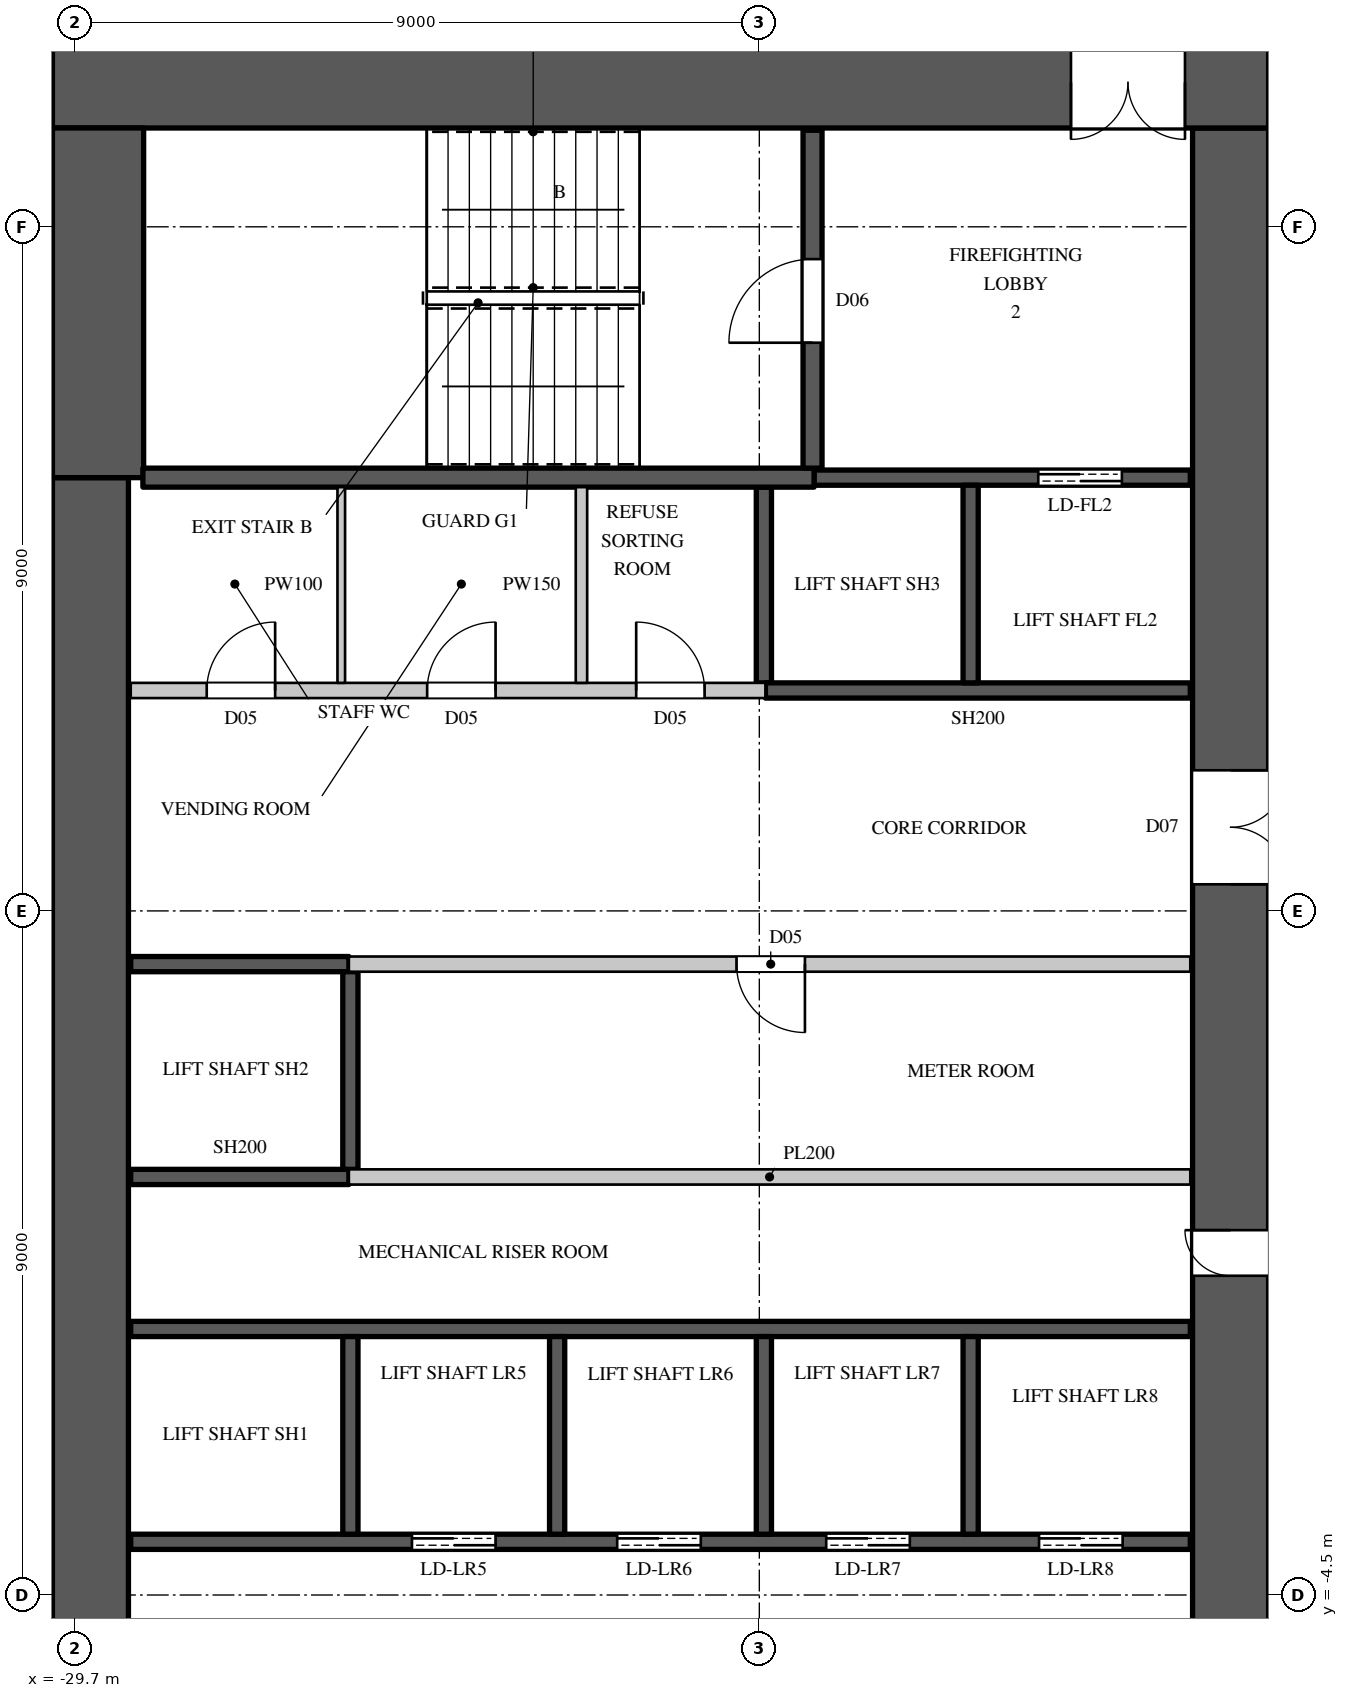
"""IFC4 building model, lengths in metres.
Left out: names, types, materials, properties, quantities, classifications, styles, units other than length and angle.
Written with IfcOpenShell. Run it as: python <this file> out.ifc"""

import sys

from ifc_helpers import new_model, si_unit, direction, frame, frame_2d, origin, place, context, subcontext, project, spatial, rectangle, extrude, element, fill, save


model = new_model("IFC4")
c1 = context("Model", 3, precision=1e-05, world=origin(), true_north=direction((0.0, 1.0)))
c2 = subcontext(c1, "Body", "Model", "MODEL_VIEW")
j1 = project(units=[si_unit("LENGTHUNIT", "METRE"), si_unit("PLANEANGLEUNIT", "RADIAN")], contexts=[c1])
p1 = place(None, origin())
s1 = spatial("IfcSite", under=j1, at=p1, CompositionType="ELEMENT")
p2 = place(p1, origin())
s2 = spatial("IfcBuilding", under=s1, at=p2, CompositionType="ELEMENT")
p3 = place(p2, frame((0.0, 0.0, 73.5)))
s3 = spatial("IfcBuildingStorey", under=s2, at=p3, CompositionType="ELEMENT", Elevation=73.5)
p4 = place(p3, frame((-30.0, 15.4, 0.0), z_axis=(0.0, 0.0, 1.0), x_axis=(1.0, 0.0, 0.0)))
e1 = element("IfcWall", 1, at=p4, inside=s3, PredefinedType="SHEAR", context=c2, shape_type="SweptSolid", body=[
    extrude(rectangle(XDim=16.0, YDim=1.2, at=frame_2d((8.0, 0.0))), origin(), (0.0, 0.0, 1.0), 3.6),
])
p5 = place(p4, frame((13.4, 0.0, 0.0)))
e2 = element("IfcOpeningElement", 2, at=p5, cuts=e1, PredefinedType="OPENING", context=c2, shape_type="SweptSolid", body=[
    extrude(rectangle(XDim=1.5, YDim=2.4, at=frame_2d((0.75, 1.2))), frame((0.0, 0.61, 0.0), z_axis=(0.0, -1.0, 0.0), x_axis=(1.0, 0.0, 0.0)), (0.0, 0.0, 1.0), 1.22),
])
p6 = place(p3, frame((-14.5, -14.8, 0.0), z_axis=(0.0, 0.0, 1.0), x_axis=(0.0, 1.0, 0.0)))
e3 = element("IfcWall", 3, at=p6, inside=s3, PredefinedType="SHEAR", context=c2, shape_type="SweptSolid", body=[
    extrude(rectangle(XDim=29.6, YDim=1.0, at=frame_2d((14.8, 0.0))), origin(), (0.0, 0.0, 1.0), 3.6),
])
p7 = place(p6, frame((8.45, 0.0, 0.0)))
e4 = element("IfcOpeningElement", 4, at=p7, cuts=e3, PredefinedType="OPENING", context=c2, shape_type="SweptSolid", body=[
    extrude(rectangle(XDim=1.5, YDim=2.4, at=frame_2d((0.75, 1.2))), frame((0.0, 0.51, 0.0), z_axis=(0.0, -1.0, 0.0), x_axis=(1.0, 0.0, 0.0)), (0.0, 0.0, 1.0), 1.02),
])
p8 = place(p6, frame((19.65, 0.0, 0.0)))
e5 = element("IfcOpeningElement", 5, at=p8, cuts=e3, PredefinedType="OPENING", context=c2, shape_type="SweptSolid", body=[
    extrude(rectangle(XDim=1.5, YDim=2.4, at=frame_2d((0.75, 1.2))), frame((0.0, 0.51, 0.0), z_axis=(0.0, -1.0, 0.0), x_axis=(1.0, 0.0, 0.0)), (0.0, 0.0, 1.0), 1.02),
])
p9 = place(p6, frame((14.5, 0.0, 0.0)))
e6 = element("IfcOpeningElement", 6, at=p9, cuts=e3, PredefinedType="OPENING", context=c2, shape_type="SweptSolid", body=[
    extrude(rectangle(XDim=0.6, YDim=2.0, at=frame_2d((0.3, 1.0))), frame((0.0, 0.51, 0.0), z_axis=(0.0, -1.0, 0.0), x_axis=(1.0, 0.0, 0.0)), (0.0, 0.0, 1.0), 1.02),
])
p10 = place(p3, frame((-29.5, -10.2, 0.0), z_axis=(0.0, 0.0, 1.0), x_axis=(0.0, 1.0, 0.0)))
e7 = element("IfcWall", 7, at=p10, inside=s3, PredefinedType="SHEAR", context=c2, shape_type="SweptSolid", body=[
    extrude(rectangle(XDim=20.4, YDim=1.0, at=frame_2d((10.2, 0.0))), origin(), (0.0, 0.0, 1.0), 3.6),
])
p11 = place(p3, frame((-29.4, 10.2, 0.0), z_axis=(0.0, 0.0, 1.0), x_axis=(0.0, 1.0, 0.0)))
e8 = element("IfcWall", 8, at=p11, inside=s3, PredefinedType="SHEAR", context=c2, shape_type="SweptSolid", body=[
    extrude(rectangle(XDim=4.6, YDim=1.2, at=frame_2d((2.3, 0.0))), origin(), (0.0, 0.0, 1.0), 3.6),
])
p12 = place(p3, frame((-28.97, 7.4, 0.0), z_axis=(0.0, 0.0, 1.0), x_axis=(1.0, 0.0, 0.0)))
e9 = element("IfcWall", 9, at=p12, inside=s3, PredefinedType="PARTITIONING", context=c2, shape_type="SweptSolid", body=[
    extrude(rectangle(XDim=8.35, YDim=0.2, at=frame_2d((4.175, 0.0))), origin(), (0.0, 0.0, 1.0), 3.3),
])
p13 = place(p12, frame((1.0, 0.0, 0.0)))
e10 = element("IfcOpeningElement", 10, at=p13, cuts=e9, PredefinedType="OPENING", context=c2, shape_type="SweptSolid", body=[
    extrude(rectangle(XDim=0.9, YDim=2.2, at=frame_2d((0.45, 1.1))), frame((0.0, 0.11, 0.0), z_axis=(0.0, -1.0, 0.0), x_axis=(1.0, 0.0, 0.0)), (0.0, 0.0, 1.0), 0.22),
])
p14 = place(p12, frame((3.9, 0.0, 0.0)))
e11 = element("IfcOpeningElement", 11, at=p14, cuts=e9, PredefinedType="OPENING", context=c2, shape_type="SweptSolid", body=[
    extrude(rectangle(XDim=0.9, YDim=2.2, at=frame_2d((0.45, 1.1))), frame((0.0, 0.11, 0.0), z_axis=(0.0, -1.0, 0.0), x_axis=(1.0, 0.0, 0.0)), (0.0, 0.0, 1.0), 0.22),
])
p15 = place(p12, frame((6.65, 0.0, 0.0)))
e12 = element("IfcOpeningElement", 12, at=p15, cuts=e9, PredefinedType="OPENING", context=c2, shape_type="SweptSolid", body=[
    extrude(rectangle(XDim=0.9, YDim=2.2, at=frame_2d((0.45, 1.1))), frame((0.0, 0.11, 0.0), z_axis=(0.0, -1.0, 0.0), x_axis=(1.0, 0.0, 0.0)), (0.0, 0.0, 1.0), 0.22),
])
p16 = place(p3, frame((-23.04, 7.5, 0.0), z_axis=(0.0, 0.0, 1.0), x_axis=(0.0, 1.0, 0.0)))
e13 = element("IfcWall", 13, at=p16, inside=s3, PredefinedType="PARTITIONING", context=c2, shape_type="SweptSolid", body=[
    extrude(rectangle(XDim=2.575, YDim=0.15, at=frame_2d((1.288, 0.0))), origin(), (0.0, 0.0, 1.0), 3.3),
])
p17 = place(p3, frame((-26.1, 1.0, 0.0), z_axis=(0.0, 0.0, 1.0), x_axis=(1.0, 0.0, 0.0)))
e14 = element("IfcWall", 14, at=p17, inside=s3, PredefinedType="PARTITIONING", context=c2, shape_type="SweptSolid", body=[
    extrude(rectangle(XDim=11.07, YDim=0.2, at=frame_2d((5.535, 0.0))), origin(), (0.0, 0.0, 1.0), 3.3),
])
p18 = place(p3, frame((-26.1, 3.8, 0.0), z_axis=(0.0, 0.0, 1.0), x_axis=(1.0, 0.0, 0.0)))
e15 = element("IfcWall", 15, at=p18, inside=s3, PredefinedType="PARTITIONING", context=c2, shape_type="SweptSolid", body=[
    extrude(rectangle(XDim=11.07, YDim=0.2, at=frame_2d((5.535, 0.0))), origin(), (0.0, 0.0, 1.0), 3.3),
])
p19 = place(p18, frame((5.1, 0.0, 0.0)))
e16 = element("IfcOpeningElement", 16, at=p19, cuts=e15, PredefinedType="OPENING", context=c2, shape_type="SweptSolid", body=[
    extrude(rectangle(XDim=0.9, YDim=2.2, at=frame_2d((0.45, 1.1))), frame((0.0, 0.11, 0.0), z_axis=(0.0, -1.0, 0.0), x_axis=(1.0, 0.0, 0.0)), (0.0, 0.0, 1.0), 0.22),
])
p20 = place(p3, frame((-28.97, -3.8, 0.0), z_axis=(0.0, 0.0, 1.0), x_axis=(1.0, 0.0, 0.0)))
e17 = element("IfcWall", 17, at=p20, inside=s3, PredefinedType="SHEAR", context=c2, shape_type="SweptSolid", body=[
    extrude(rectangle(XDim=13.94, YDim=0.2, at=frame_2d((6.97, 0.0))), origin(), (0.0, 0.0, 1.0), 3.3),
])
p21 = place(p20, frame((3.7, 0.0, 0.0)))
e18 = element("IfcOpeningElement", 18, at=p21, cuts=e17, PredefinedType="OPENING", context=c2, shape_type="SweptSolid", body=[
    extrude(rectangle(XDim=1.1, YDim=2.2, at=frame_2d((0.55, 1.1))), frame((0.0, 0.11, 0.0), z_axis=(0.0, -1.0, 0.0), x_axis=(1.0, 0.0, 0.0)), (0.0, 0.0, 1.0), 0.22),
])
p22 = place(p20, frame((6.4, 0.0, 0.0)))
e19 = element("IfcOpeningElement", 19, at=p22, cuts=e17, PredefinedType="OPENING", context=c2, shape_type="SweptSolid", body=[
    extrude(rectangle(XDim=1.1, YDim=2.2, at=frame_2d((0.55, 1.1))), frame((0.0, 0.11, 0.0), z_axis=(0.0, -1.0, 0.0), x_axis=(1.0, 0.0, 0.0)), (0.0, 0.0, 1.0), 0.22),
])
p23 = place(p20, frame((9.15, 0.0, 0.0)))
e20 = element("IfcOpeningElement", 20, at=p23, cuts=e17, PredefinedType="OPENING", context=c2, shape_type="SweptSolid", body=[
    extrude(rectangle(XDim=1.1, YDim=2.2, at=frame_2d((0.55, 1.1))), frame((0.0, 0.11, 0.0), z_axis=(0.0, -1.0, 0.0), x_axis=(1.0, 0.0, 0.0)), (0.0, 0.0, 1.0), 0.22),
])
p24 = place(p20, frame((11.95, 0.0, 0.0)))
e21 = element("IfcOpeningElement", 21, at=p24, cuts=e17, PredefinedType="OPENING", context=c2, shape_type="SweptSolid", body=[
    extrude(rectangle(XDim=1.1, YDim=2.2, at=frame_2d((0.55, 1.1))), frame((0.0, 0.11, 0.0), z_axis=(0.0, -1.0, 0.0), x_axis=(1.0, 0.0, 0.0)), (0.0, 0.0, 1.0), 0.22),
])
p25 = place(p3, frame((-28.97, -1.0, 0.0), z_axis=(0.0, 0.0, 1.0), x_axis=(1.0, 0.0, 0.0)))
e22 = element("IfcWall", 22, at=p25, inside=s3, PredefinedType="SHEAR", context=c2, shape_type="SweptSolid", body=[
    extrude(rectangle(XDim=13.94, YDim=0.2, at=frame_2d((6.97, 0.0))), origin(), (0.0, 0.0, 1.0), 3.3),
])
for number, where, z_axis, x_axis in (
    (23, (-28.97, 1.0, 0.0), (0.0, 0.0, 1.0), (1.0, 0.0, 0.0)),
    (24, (-28.97, 3.8, 0.0), (0.0, 0.0, 1.0), (1.0, 0.0, 0.0)),
):
    element("IfcWall", number, at=place(p3, frame(where, z_axis=z_axis, x_axis=x_axis)), inside=s3, PredefinedType="SHEAR", context=c2, shape_type="SweptSolid", body=[
        extrude(rectangle(XDim=2.87, YDim=0.2, at=frame_2d((1.435, 0.0))), origin(), (0.0, 0.0, 1.0), 3.3),
    ])
p26 = place(p3, frame((-26.08, -3.7, 0.0), z_axis=(0.0, 0.0, 1.0), x_axis=(0.0, 1.0, 0.0)))
e25 = element("IfcWall", 25, at=p26, inside=s3, PredefinedType="SHEAR", context=c2, shape_type="SweptSolid", body=[
    extrude(rectangle(XDim=2.6, YDim=0.2, at=frame_2d((1.3, 0.0))), origin(), (0.0, 0.0, 1.0), 3.6),
])
p27 = place(p3, frame((-26.08, 1.1, 0.0), z_axis=(0.0, 0.0, 1.0), x_axis=(0.0, 1.0, 0.0)))
e26 = element("IfcWall", 26, at=p27, inside=s3, PredefinedType="SHEAR", context=c2, shape_type="SweptSolid", body=[
    extrude(rectangle(XDim=2.6, YDim=0.2, at=frame_2d((1.3, 0.0))), origin(), (0.0, 0.0, 1.0), 3.3),
])
for number, where, z_axis, x_axis in (
    (27, (-23.36, -3.7, 0.0), (0.0, 0.0, 1.0), (0.0, 1.0, 0.0)),
    (28, (-20.64, -3.7, 0.0), (0.0, 0.0, 1.0), (0.0, 1.0, 0.0)),
):
    element("IfcWall", number, at=place(p3, frame(where, z_axis=z_axis, x_axis=x_axis)), inside=s3, PredefinedType="SHEAR", context=c2, shape_type="SweptSolid", body=[
        extrude(rectangle(XDim=2.6, YDim=0.2, at=frame_2d((1.3, 0.0))), origin(), (0.0, 0.0, 1.0), 3.6),
    ])
p28 = place(p3, frame((-20.64, 7.5, 0.0), z_axis=(0.0, 0.0, 1.0), x_axis=(0.0, 1.0, 0.0)))
e29 = element("IfcWall", 29, at=p28, inside=s3, PredefinedType="SHEAR", context=c2, shape_type="SweptSolid", body=[
    extrude(rectangle(XDim=2.575, YDim=0.2, at=frame_2d((1.288, 0.0))), origin(), (0.0, 0.0, 1.0), 3.3),
])
p29 = place(p3, frame((-20.62, 7.4, 0.0), z_axis=(0.0, 0.0, 1.0), x_axis=(1.0, 0.0, 0.0)))
e30 = element("IfcWall", 30, at=p29, inside=s3, PredefinedType="SHEAR", context=c2, shape_type="SweptSolid", body=[
    extrude(rectangle(XDim=5.59, YDim=0.2, at=frame_2d((2.795, 0.0))), origin(), (0.0, 0.0, 1.0), 3.3),
])
p30 = place(p3, frame((-19.98, 10.2, 0.0), z_axis=(0.0, 0.0, 1.0), x_axis=(1.0, 0.0, 0.0)))
e31 = element("IfcWall", 31, at=p30, inside=s3, PredefinedType="SHEAR", context=c2, shape_type="SweptSolid", body=[
    extrude(rectangle(XDim=4.95, YDim=0.2, at=frame_2d((2.475, 0.0))), origin(), (0.0, 0.0, 1.0), 3.3),
])
p31 = place(p30, frame((2.95, 0.0, 0.0)))
e32 = element("IfcOpeningElement", 32, at=p31, cuts=e31, PredefinedType="OPENING", context=c2, shape_type="SweptSolid", body=[
    extrude(rectangle(XDim=1.1, YDim=2.2, at=frame_2d((0.55, 1.1))), frame((0.0, 0.11, 0.0), z_axis=(0.0, -1.0, 0.0), x_axis=(1.0, 0.0, 0.0)), (0.0, 0.0, 1.0), 0.22),
])
p32 = place(p3, frame((-17.92, -3.7, 0.0), z_axis=(0.0, 0.0, 1.0), x_axis=(0.0, 1.0, 0.0)))
e33 = element("IfcWall", 33, at=p32, inside=s3, PredefinedType="SHEAR", context=c2, shape_type="SweptSolid", body=[
    extrude(rectangle(XDim=2.6, YDim=0.2, at=frame_2d((1.3, 0.0))), origin(), (0.0, 0.0, 1.0), 3.6),
])
p33 = place(p3, frame((-17.92, 7.5, 0.0), z_axis=(0.0, 0.0, 1.0), x_axis=(0.0, 1.0, 0.0)))
e34 = element("IfcWall", 34, at=p33, inside=s3, PredefinedType="SHEAR", context=c2, shape_type="SweptSolid", body=[
    extrude(rectangle(XDim=2.6, YDim=0.2, at=frame_2d((1.3, 0.0))), origin(), (0.0, 0.0, 1.0), 3.6),
])
p34 = place(p3, frame((-28.81, 10.2, 0.0), z_axis=(0.0, 0.0, 1.0), x_axis=(1.0, 0.0, 0.0)))
e35 = element("IfcWall", 35, at=p34, inside=s3, PredefinedType="SHEAR", context=c2, shape_type="SweptSolid", body=[
    extrude(rectangle(XDim=8.83, YDim=0.25, at=frame_2d((4.415, 0.0))), origin(), (0.0, 0.0, 1.0), 3.3),
])
p35 = place(p3, frame((-20.0, 10.325, 0.0), z_axis=(0.0, 0.0, 1.0), x_axis=(0.0, 1.0, 0.0)))
e36 = element("IfcWall", 36, at=p35, inside=s3, PredefinedType="SHEAR", context=c2, shape_type="SweptSolid", body=[
    extrude(rectangle(XDim=4.445, YDim=0.25, at=frame_2d((2.223, 0.0))), origin(), (0.0, 0.0, 1.0), 3.3),
])
p36 = place(p35, frame((1.65, 0.0, 0.0)))
e37 = element("IfcOpeningElement", 37, at=p36, cuts=e36, PredefinedType="OPENING", context=c2, shape_type="SweptSolid", body=[
    extrude(rectangle(XDim=1.1, YDim=2.2, at=frame_2d((0.55, 1.1))), frame((0.0, 0.135, 0.0), z_axis=(0.0, -1.0, 0.0), x_axis=(1.0, 0.0, 0.0)), (0.0, 0.0, 1.0), 0.27),
])
p37 = place(p3, frame((-26.2, 7.5, 0.0), z_axis=(0.0, 0.0, 1.0), x_axis=(0.0, 1.0, 0.0)))
e38 = element("IfcWall", 38, at=p37, inside=s3, PredefinedType="PARTITIONING", context=c2, shape_type="SweptSolid", body=[
    extrude(rectangle(XDim=2.575, YDim=0.1, at=frame_2d((1.288, 0.0))), origin(), (0.0, 0.0, 1.0), 3.3),
])
p38 = place(p36, origin())
e39 = element("IfcDoor", 39, at=p38, inside=s3, OperationType="SINGLE_SWING_LEFT", PredefinedType="DOOR", context=c2, shape_type="SweptSolid", body=[
    extrude(rectangle(XDim=1.1, YDim=2.2, at=frame_2d((0.55, 1.1))), frame((0.0, 0.025, 0.0), z_axis=(0.0, -1.0, 0.0), x_axis=(1.0, 0.0, 0.0)), (0.0, 0.0, 1.0), 0.05),
])
fill(e37, e39)
p39 = place(p19, origin())
e40 = element("IfcDoor", 40, at=p39, inside=s3, OperationType="SINGLE_SWING_LEFT", PredefinedType="DOOR", context=c2, shape_type="SweptSolid", body=[
    extrude(rectangle(XDim=0.9, YDim=2.2, at=frame_2d((0.45, 1.1))), frame((0.0, 0.025, 0.0), z_axis=(0.0, -1.0, 0.0), x_axis=(1.0, 0.0, 0.0)), (0.0, 0.0, 1.0), 0.05),
])
fill(e16, e40)
p40 = place(p13, origin())
e41 = element("IfcDoor", 41, at=p40, inside=s3, OperationType="SINGLE_SWING_RIGHT", PredefinedType="DOOR", context=c2, shape_type="SweptSolid", body=[
    extrude(rectangle(XDim=0.9, YDim=2.2, at=frame_2d((0.45, 1.1))), frame((0.0, 0.025, 0.0), z_axis=(0.0, -1.0, 0.0), x_axis=(1.0, 0.0, 0.0)), (0.0, 0.0, 1.0), 0.05),
])
fill(e10, e41)
p41 = place(p14, origin())
e42 = element("IfcDoor", 42, at=p41, inside=s3, OperationType="SINGLE_SWING_RIGHT", PredefinedType="DOOR", context=c2, shape_type="SweptSolid", body=[
    extrude(rectangle(XDim=0.9, YDim=2.2, at=frame_2d((0.45, 1.1))), frame((0.0, 0.025, 0.0), z_axis=(0.0, -1.0, 0.0), x_axis=(1.0, 0.0, 0.0)), (0.0, 0.0, 1.0), 0.05),
])
fill(e11, e42)
p42 = place(p15, origin())
e43 = element("IfcDoor", 43, at=p42, inside=s3, OperationType="SINGLE_SWING_LEFT", PredefinedType="DOOR", context=c2, shape_type="SweptSolid", body=[
    extrude(rectangle(XDim=0.9, YDim=2.2, at=frame_2d((0.45, 1.1))), frame((0.0, 0.025, 0.0), z_axis=(0.0, -1.0, 0.0), x_axis=(1.0, 0.0, 0.0)), (0.0, 0.0, 1.0), 0.05),
])
fill(e12, e43)
p43 = place(p21, origin())
e44 = element("IfcDoor", 44, at=p43, inside=s3, OperationType="DOUBLE_DOOR_SLIDING", PredefinedType="DOOR", context=c2, shape_type="SweptSolid", body=[
    extrude(rectangle(XDim=1.1, YDim=2.2, at=frame_2d((0.55, 1.1))), frame((0.0, 0.025, 0.0), z_axis=(0.0, -1.0, 0.0), x_axis=(1.0, 0.0, 0.0)), (0.0, 0.0, 1.0), 0.05),
])
fill(e18, e44)
p44 = place(p22, origin())
e45 = element("IfcDoor", 45, at=p44, inside=s3, OperationType="DOUBLE_DOOR_SLIDING", PredefinedType="DOOR", context=c2, shape_type="SweptSolid", body=[
    extrude(rectangle(XDim=1.1, YDim=2.2, at=frame_2d((0.55, 1.1))), frame((0.0, 0.025, 0.0), z_axis=(0.0, -1.0, 0.0), x_axis=(1.0, 0.0, 0.0)), (0.0, 0.0, 1.0), 0.05),
])
fill(e19, e45)
p45 = place(p23, origin())
e46 = element("IfcDoor", 46, at=p45, inside=s3, OperationType="DOUBLE_DOOR_SLIDING", PredefinedType="DOOR", context=c2, shape_type="SweptSolid", body=[
    extrude(rectangle(XDim=1.1, YDim=2.2, at=frame_2d((0.55, 1.1))), frame((0.0, 0.025, 0.0), z_axis=(0.0, -1.0, 0.0), x_axis=(1.0, 0.0, 0.0)), (0.0, 0.0, 1.0), 0.05),
])
fill(e20, e46)
p46 = place(p24, origin())
e47 = element("IfcDoor", 47, at=p46, inside=s3, OperationType="DOUBLE_DOOR_SLIDING", PredefinedType="DOOR", context=c2, shape_type="SweptSolid", body=[
    extrude(rectangle(XDim=1.1, YDim=2.2, at=frame_2d((0.55, 1.1))), frame((0.0, 0.025, 0.0), z_axis=(0.0, -1.0, 0.0), x_axis=(1.0, 0.0, 0.0)), (0.0, 0.0, 1.0), 0.05),
])
fill(e21, e47)
p47 = place(p31, origin())
e48 = element("IfcDoor", 48, at=p47, inside=s3, OperationType="DOUBLE_DOOR_SLIDING", PredefinedType="DOOR", context=c2, shape_type="SweptSolid", body=[
    extrude(rectangle(XDim=1.1, YDim=2.2, at=frame_2d((0.55, 1.1))), frame((0.0, 0.025, 0.0), z_axis=(0.0, -1.0, 0.0), x_axis=(1.0, 0.0, 0.0)), (0.0, 0.0, 1.0), 0.05),
])
fill(e32, e48)
p48 = place(p5, origin())
e49 = element("IfcDoor", 49, at=p48, inside=s3, OperationType="DOUBLE_DOOR_SINGLE_SWING", PredefinedType="DOOR", context=c2, shape_type="SweptSolid", body=[
    extrude(rectangle(XDim=1.5, YDim=2.4, at=frame_2d((0.75, 1.2))), frame((0.0, 0.025, 0.0), z_axis=(0.0, -1.0, 0.0), x_axis=(1.0, 0.0, 0.0)), (0.0, 0.0, 1.0), 0.05),
])
fill(e2, e49)
p49 = place(p8, origin())
e50 = element("IfcDoor", 50, at=p49, inside=s3, OperationType="DOUBLE_DOOR_SINGLE_SWING", PredefinedType="DOOR", context=c2, shape_type="SweptSolid", body=[
    extrude(rectangle(XDim=1.5, YDim=2.4, at=frame_2d((0.75, 1.2))), frame((0.0, -0.445, 0.0), z_axis=(0.0, -1.0, 0.0), x_axis=(1.0, 0.0, 0.0)), (0.0, 0.0, 1.0), 0.05),
])
fill(e5, e50)
p50 = place(p9, origin())
e51 = element("IfcDoor", 51, at=p50, inside=s3, OperationType="SINGLE_SWING_RIGHT", PredefinedType="DOOR", context=c2, shape_type="SweptSolid", body=[
    extrude(rectangle(XDim=0.6, YDim=2.0, at=frame_2d((0.3, 1.0))), frame((0.0, 0.495, 0.0), z_axis=(0.0, -1.0, 0.0), x_axis=(1.0, 0.0, 0.0)), (0.0, 0.0, 1.0), 0.05),
])
fill(e6, e51)
save(model, sys.argv[1])
